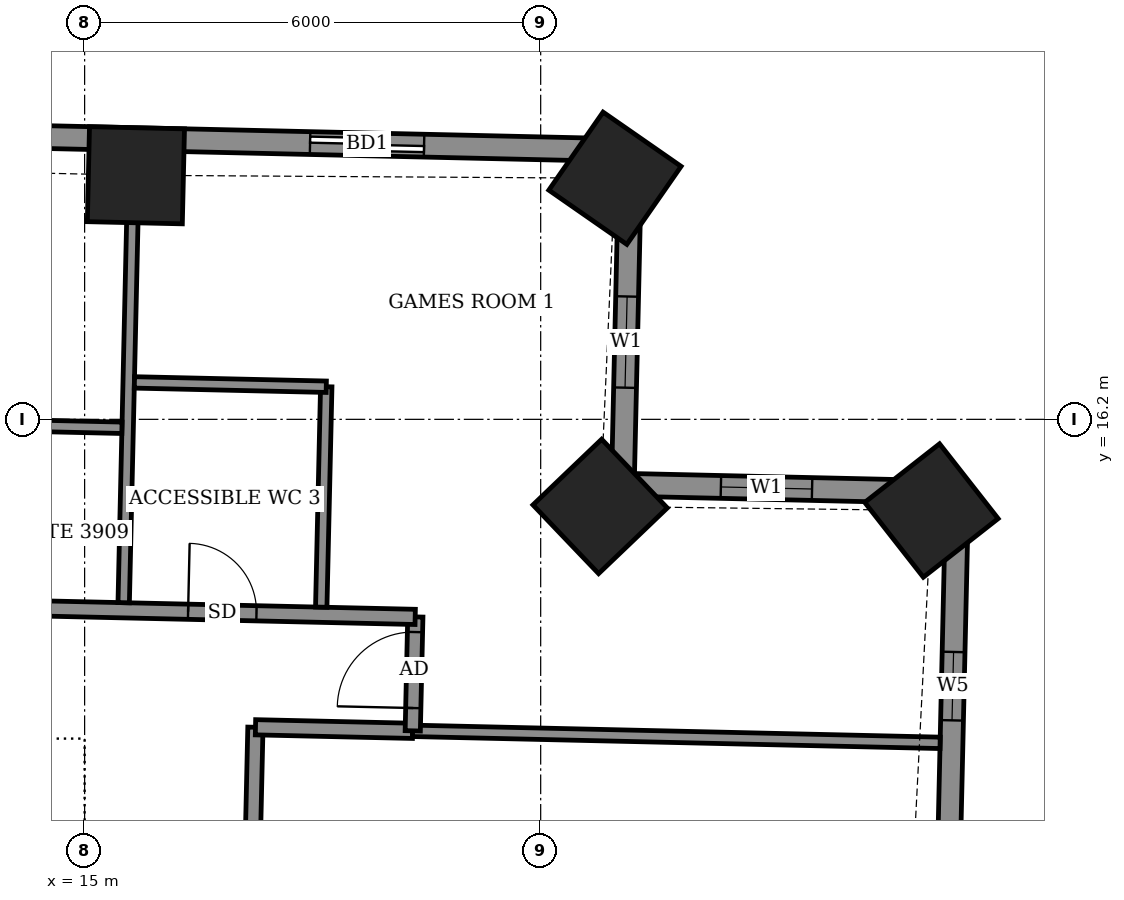
"""IFC4 building model, lengths in metres.
Left out: names, types, materials, properties, quantities, classifications, styles, units other than length and angle.
Written with IfcOpenShell. Run it as: python <this file> out.ifc"""

import sys

from ifc_helpers import new_model, si_unit, direction, frame, frame_2d, origin, origin_2d, place, context, subcontext, project, spatial, rectangle, extrude, element, fill, save


model = new_model("IFC4")
c1 = context("Model", 3, precision=1e-05, world=origin(), true_north=direction((0.0, 1.0)))
c2 = subcontext(c1, "Body", "Model", "MODEL_VIEW")
j1 = project(units=[si_unit("LENGTHUNIT", "METRE"), si_unit("PLANEANGLEUNIT", "RADIAN")], contexts=[c1])
p1 = place(None, origin())
s1 = spatial("IfcSite", under=j1, at=p1, CompositionType="ELEMENT")
p2 = place(p1, origin())
s2 = spatial("IfcBuilding", under=s1, at=p2, CompositionType="ELEMENT")
p3 = place(p2, frame((0.0, 0.0, 156.3)))
s3 = spatial("IfcBuildingStorey", under=s2, at=p3, CompositionType="ELEMENT", Elevation=156.3)
for number, where, z_axis, x_axis in (
    (1, (26.141, 15.001, -0.55), (0.0, 0.0, 1.0), (-0.617, 0.787, 0.0)),
    (2, (21.782, 15.054, -0.55), (0.0, 0.0, 1.0), (-0.691, 0.723, 0.0)),
    (3, (21.977, 19.372, -0.55), (0.0, 0.0, 1.0), (-0.821, 0.571, 0.0)),
    (4, (15.675, 19.411, -0.55), (0.0, 0.0, 1.0), (-1.0, 0.023, 0.0)),
):
    element("IfcColumn", number, at=place(p3, frame(where, z_axis=z_axis, x_axis=x_axis)), inside=s3, PredefinedType="COLUMN", context=c2, shape_type="SweptSolid", body=[
        extrude(rectangle(XDim=1.25, YDim=1.25, at=origin_2d()), origin(), (0.0, 0.0, 1.0), 3.6),
    ])
p4 = place(p3, frame((26.238, 4.613, 0.0), z_axis=(0.0, 0.0, 1.0), x_axis=(0.022761056451, 0.999740933597, 0.0)))
e5 = element("IfcWall", 5, at=p4, inside=s3, PredefinedType="SOLIDWALL", context=c2, shape_type="SweptSolid", body=[
    extrude(rectangle(XDim=10.63, YDim=0.3, at=frame_2d((5.315, 0.0))), origin(), (0.0, 0.0, 1.0), 3.05),
])
p5 = place(p4, frame((3.453, 0.0, 0.0)))
e6 = element("IfcOpeningElement", 6, at=p5, cuts=e5, PredefinedType="OPENING", context=c2, shape_type="SweptSolid", body=[
    extrude(rectangle(XDim=1.2, YDim=2.4, at=frame_2d((0.6, 1.2))), frame((0.0, 0.16, 0.0), z_axis=(0.0, -1.0, 0.0), x_axis=(1.0, 0.0, 0.0)), (0.0, 0.0, 1.0), 0.32),
])
p6 = place(p4, frame((7.629, 0.0, 0.9)))
e7 = element("IfcOpeningElement", 7, at=p6, cuts=e5, PredefinedType="OPENING", context=c2, shape_type="SweptSolid", body=[
    extrude(rectangle(XDim=0.9, YDim=1.5, at=frame_2d((0.45, 0.75))), frame((0.0, 0.16, 0.0), z_axis=(0.0, -1.0, 0.0), x_axis=(1.0, 0.0, 0.0)), (0.0, 0.0, 1.0), 0.32),
])
p7 = place(p3, frame((26.48, 15.24, 0.0), z_axis=(0.0, 0.0, 1.0), x_axis=(-0.999741204967, 0.022749133868, 0.0)))
e8 = element("IfcWall", 8, at=p7, inside=s3, PredefinedType="SOLIDWALL", context=c2, shape_type="SweptSolid", body=[
    extrude(rectangle(XDim=4.4, YDim=0.3, at=frame_2d((2.2, 0.0))), origin(), (0.0, 0.0, 1.0), 2.55),
])
p8 = place(p7, frame((1.91, 0.0, 0.9)))
e9 = element("IfcOpeningElement", 9, at=p8, cuts=e8, PredefinedType="OPENING", context=c2, shape_type="SweptSolid", body=[
    extrude(rectangle(XDim=1.2, YDim=1.5, at=frame_2d((0.6, 0.75))), frame((0.0, 0.16, 0.0), z_axis=(0.0, -1.0, 0.0), x_axis=(1.0, 0.0, 0.0)), (0.0, 0.0, 1.0), 0.32),
])
p9 = place(p3, frame((22.081, 15.34, 0.0), z_axis=(0.0, 0.0, 1.0), x_axis=(0.022693676786, 0.999742465355, 0.0)))
e10 = element("IfcWall", 10, at=p9, inside=s3, PredefinedType="SOLIDWALL", context=c2, shape_type="SweptSolid", body=[
    extrude(rectangle(XDim=4.4, YDim=0.3, at=frame_2d((2.2, 0.0))), origin(), (0.0, 0.0, 1.0), 2.55),
])
p10 = place(p9, frame((1.277, 0.0, 0.9)))
e11 = element("IfcOpeningElement", 11, at=p10, cuts=e10, PredefinedType="OPENING", context=c2, shape_type="SweptSolid", body=[
    extrude(rectangle(XDim=1.2, YDim=1.5, at=frame_2d((0.6, 0.75))), frame((0.0, 0.16, 0.0), z_axis=(0.0, -1.0, 0.0), x_axis=(1.0, 0.0, 0.0)), (0.0, 0.0, 1.0), 0.32),
])
p11 = place(p3, frame((22.181, 19.739, 0.0), z_axis=(0.0, 0.0, 1.0), x_axis=(-0.999742618326, 0.022686936846, 0.0)))
e12 = element("IfcWall", 12, at=p11, inside=s3, PredefinedType="SOLIDWALL", context=c2, shape_type="SweptSolid", body=[
    extrude(rectangle(XDim=39.58, YDim=0.3, at=frame_2d((19.79, 0.0))), origin(), (0.0, 0.0, 1.0), 3.05),
])
p12 = place(p11, frame((2.716, 0.0, 0.0)))
e13 = element("IfcOpeningElement", 13, at=p12, cuts=e12, PredefinedType="OPENING", context=c2, shape_type="SweptSolid", body=[
    extrude(rectangle(XDim=1.5, YDim=2.4, at=frame_2d((0.75, 1.2))), frame((0.0, 0.16, 0.0), z_axis=(0.0, -1.0, 0.0), x_axis=(1.0, 0.0, 0.0)), (0.0, 0.0, 1.0), 0.32),
])
p13 = place(p11, frame((8.326, 0.0, 0.0)))
e14 = element("IfcOpeningElement", 14, at=p13, cuts=e12, PredefinedType="OPENING", context=c2, shape_type="SweptSolid", body=[
    extrude(rectangle(XDim=1.5, YDim=2.4, at=frame_2d((0.75, 1.2))), frame((0.0, 0.16, 0.0), z_axis=(0.0, -1.0, 0.0), x_axis=(1.0, 0.0, 0.0)), (0.0, 0.0, 1.0), 0.32),
])
p14 = place(p11, frame((14.049, 0.0, 0.0)))
e15 = element("IfcOpeningElement", 15, at=p14, cuts=e12, PredefinedType="OPENING", context=c2, shape_type="SweptSolid", body=[
    extrude(rectangle(XDim=1.5, YDim=2.4, at=frame_2d((0.75, 1.2))), frame((0.0, 0.16, 0.0), z_axis=(0.0, -1.0, 0.0), x_axis=(1.0, 0.0, 0.0)), (0.0, 0.0, 1.0), 0.32),
])
p15 = place(p11, frame((16.998, 0.0, 0.0)))
e16 = element("IfcOpeningElement", 16, at=p15, cuts=e12, PredefinedType="OPENING", context=c2, shape_type="SweptSolid", body=[
    extrude(rectangle(XDim=1.5, YDim=2.4, at=frame_2d((0.75, 1.2))), frame((0.0, 0.16, 0.0), z_axis=(0.0, -1.0, 0.0), x_axis=(1.0, 0.0, 0.0)), (0.0, 0.0, 1.0), 0.32),
])
p16 = place(p11, frame((22.48, 0.0, 0.0)))
e17 = element("IfcOpeningElement", 17, at=p16, cuts=e12, PredefinedType="OPENING", context=c2, shape_type="SweptSolid", body=[
    extrude(rectangle(XDim=1.5, YDim=2.4, at=frame_2d((0.75, 1.2))), frame((0.0, 0.16, 0.0), z_axis=(0.0, -1.0, 0.0), x_axis=(1.0, 0.0, 0.0)), (0.0, 0.0, 1.0), 0.32),
])
p17 = place(p11, frame((27.846, 0.0, 0.0)))
e18 = element("IfcOpeningElement", 18, at=p17, cuts=e12, PredefinedType="OPENING", context=c2, shape_type="SweptSolid", body=[
    extrude(rectangle(XDim=1.5, YDim=2.4, at=frame_2d((0.75, 1.2))), frame((0.0, 0.16, 0.0), z_axis=(0.0, -1.0, 0.0), x_axis=(1.0, 0.0, 0.0)), (0.0, 0.0, 1.0), 0.32),
])
p18 = place(p11, frame((30.794, 0.0, 0.0)))
e19 = element("IfcOpeningElement", 19, at=p18, cuts=e12, PredefinedType="OPENING", context=c2, shape_type="SweptSolid", body=[
    extrude(rectangle(XDim=1.5, YDim=2.4, at=frame_2d((0.75, 1.2))), frame((0.0, 0.16, 0.0), z_axis=(0.0, -1.0, 0.0), x_axis=(1.0, 0.0, 0.0)), (0.0, 0.0, 1.0), 0.32),
])
p19 = place(p11, frame((35.705, 0.0, 0.9)))
e20 = element("IfcOpeningElement", 20, at=p19, cuts=e12, PredefinedType="OPENING", context=c2, shape_type="SweptSolid", body=[
    extrude(rectangle(XDim=2.4, YDim=1.5, at=frame_2d((1.2, 0.75))), frame((0.0, 0.16, 0.0), z_axis=(0.0, -1.0, 0.0), x_axis=(1.0, 0.0, 0.0)), (0.0, 0.0, 1.0), 0.32),
])
p20 = place(p3, frame((17.149, 7.832, 0.0), z_axis=(0.0, 0.0, 1.0), x_axis=(0.022729111383, 0.999741660378, 0.0)))
e21 = element("IfcWall", 21, at=p20, inside=s3, PredefinedType="PARTITIONING", context=c2, shape_type="SweptSolid", body=[
    extrude(rectangle(XDim=4.318, YDim=0.2, at=frame_2d((2.159, 0.0))), origin(), (0.0, 0.0, 1.0), 3.05),
])
p21 = place(p20, frame((1.761, 0.0, 0.0)))
e22 = element("IfcOpeningElement", 22, at=p21, cuts=e21, PredefinedType="OPENING", context=c2, shape_type="SweptSolid", body=[
    extrude(rectangle(XDim=1.0, YDim=2.1, at=frame_2d((0.5, 1.05))), frame((0.0, 0.11, 0.0), z_axis=(0.0, -1.0, 0.0), x_axis=(1.0, 0.0, 0.0)), (0.0, 0.0, 1.0), 0.22),
])
p22 = place(p3, frame((17.248, 12.149, 0.0), z_axis=(0.0, 0.0, 1.0), x_axis=(0.999742931749, -0.02267312106, 0.0)))
e23 = element("IfcWall", 23, at=p22, inside=s3, PredefinedType="PARTITIONING", context=c2, shape_type="SweptSolid", body=[
    extrude(rectangle(XDim=2.067, YDim=0.2, at=frame_2d((1.034, 0.0))), origin(), (0.0, 0.0, 1.0), 3.05),
])
p23 = place(p3, frame((19.315, 12.102, 0.0), z_axis=(0.0, 0.0, 1.0), x_axis=(0.999741072391, -0.022754959327, 0.0)))
e24 = element("IfcWall", 24, at=p23, inside=s3, PredefinedType="PARTITIONING", context=c2, shape_type="SweptSolid", body=[
    extrude(rectangle(XDim=6.942, YDim=0.15, at=frame_2d((3.471, 0.0))), origin(), (0.0, 0.0, 1.0), 2.55),
])
p24 = place(p3, frame((19.317, 12.102, 0.0), z_axis=(0.0, 0.0, 1.0), x_axis=(0.02279537805, 0.999740151609, 0.0)))
e25 = element("IfcWall", 25, at=p24, inside=s3, PredefinedType="PARTITIONING", context=c2, shape_type="SweptSolid", body=[
    extrude(rectangle(XDim=1.5, YDim=0.2, at=frame_2d((0.75, 0.0))), origin(), (0.0, 0.0, 1.0), 3.05),
])
p25 = place(p24, frame((0.3, 0.0, 0.0)))
e26 = element("IfcOpeningElement", 26, at=p25, cuts=e25, PredefinedType="OPENING", context=c2, shape_type="SweptSolid", body=[
    extrude(rectangle(XDim=1.0, YDim=2.1, at=frame_2d((0.5, 1.05))), frame((0.0, 0.11, 0.0), z_axis=(0.0, -1.0, 0.0), x_axis=(1.0, 0.0, 0.0)), (0.0, 0.0, 1.0), 0.22),
])
p26 = place(p3, frame((-21.279, 14.523, 0.0), z_axis=(0.0, 0.0, 1.0), x_axis=(0.999742669174, -0.02268469602, 0.0)))
e27 = element("IfcWall", 27, at=p26, inside=s3, PredefinedType="PARTITIONING", context=c2, shape_type="SweptSolid", body=[
    extrude(rectangle(XDim=40.639, YDim=0.2, at=frame_2d((20.319, 0.0))), origin(), (0.0, 0.0, 1.0), 3.05),
])
p27 = place(p26, frame((37.65, 0.0, 0.0)))
e28 = element("IfcOpeningElement", 28, at=p27, cuts=e27, PredefinedType="OPENING", context=c2, shape_type="SweptSolid", body=[
    extrude(rectangle(XDim=0.9, YDim=2.1, at=frame_2d((0.45, 1.05))), frame((0.0, 0.11, 0.0), z_axis=(0.0, -1.0, 0.0), x_axis=(1.0, 0.0, 0.0)), (0.0, 0.0, 1.0), 0.22),
])
p28 = place(p26, frame((32.775, 0.0, 0.0)))
e29 = element("IfcOpeningElement", 29, at=p28, cuts=e27, PredefinedType="OPENING", context=c2, shape_type="SweptSolid", body=[
    extrude(rectangle(XDim=0.9, YDim=2.1, at=frame_2d((0.45, 1.05))), frame((0.0, 0.11, 0.0), z_axis=(0.0, -1.0, 0.0), x_axis=(1.0, 0.0, 0.0)), (0.0, 0.0, 1.0), 0.22),
])
p29 = place(p26, frame((30.4, 0.0, 0.0)))
e30 = element("IfcOpeningElement", 30, at=p29, cuts=e27, PredefinedType="OPENING", context=c2, shape_type="SweptSolid", body=[
    extrude(rectangle(XDim=0.9, YDim=2.1, at=frame_2d((0.45, 1.05))), frame((0.0, 0.11, 0.0), z_axis=(0.0, -1.0, 0.0), x_axis=(1.0, 0.0, 0.0)), (0.0, 0.0, 1.0), 0.22),
])
p30 = place(p26, frame((23.225, 0.0, 0.0)))
e31 = element("IfcOpeningElement", 31, at=p30, cuts=e27, PredefinedType="OPENING", context=c2, shape_type="SweptSolid", body=[
    extrude(rectangle(XDim=0.9, YDim=2.1, at=frame_2d((0.45, 1.05))), frame((0.0, 0.11, 0.0), z_axis=(0.0, -1.0, 0.0), x_axis=(1.0, 0.0, 0.0)), (0.0, 0.0, 1.0), 0.22),
])
p31 = place(p26, frame((20.85, 0.0, 0.0)))
e32 = element("IfcOpeningElement", 32, at=p31, cuts=e27, PredefinedType="OPENING", context=c2, shape_type="SweptSolid", body=[
    extrude(rectangle(XDim=0.9, YDim=2.1, at=frame_2d((0.45, 1.05))), frame((0.0, 0.11, 0.0), z_axis=(0.0, -1.0, 0.0), x_axis=(1.0, 0.0, 0.0)), (0.0, 0.0, 1.0), 0.22),
])
p32 = place(p26, frame((13.675, 0.0, 0.0)))
e33 = element("IfcOpeningElement", 33, at=p32, cuts=e27, PredefinedType="OPENING", context=c2, shape_type="SweptSolid", body=[
    extrude(rectangle(XDim=0.9, YDim=2.1, at=frame_2d((0.45, 1.05))), frame((0.0, 0.11, 0.0), z_axis=(0.0, -1.0, 0.0), x_axis=(1.0, 0.0, 0.0)), (0.0, 0.0, 1.0), 0.22),
])
p33 = place(p26, frame((11.325, 0.0, 0.0)))
e34 = element("IfcOpeningElement", 34, at=p33, cuts=e27, PredefinedType="OPENING", context=c2, shape_type="SweptSolid", body=[
    extrude(rectangle(XDim=0.9, YDim=2.1, at=frame_2d((0.45, 1.05))), frame((0.0, 0.11, 0.0), z_axis=(0.0, -1.0, 0.0), x_axis=(1.0, 0.0, 0.0)), (0.0, 0.0, 1.0), 0.22),
])
p34 = place(p26, frame((1.6, 0.0, 0.0)))
e35 = element("IfcOpeningElement", 35, at=p34, cuts=e27, PredefinedType="OPENING", context=c2, shape_type="SweptSolid", body=[
    extrude(rectangle(XDim=1.0, YDim=2.1, at=frame_2d((0.5, 1.05))), frame((0.0, 0.11, 0.0), z_axis=(0.0, -1.0, 0.0), x_axis=(1.0, 0.0, 0.0)), (0.0, 0.0, 1.0), 0.22),
])
p35 = place(p26, frame((6.55, 0.0, 0.0)))
e36 = element("IfcOpeningElement", 36, at=p35, cuts=e27, PredefinedType="OPENING", context=c2, shape_type="SweptSolid", body=[
    extrude(rectangle(XDim=0.9, YDim=2.1, at=frame_2d((0.45, 1.05))), frame((0.0, 0.11, 0.0), z_axis=(0.0, -1.0, 0.0), x_axis=(1.0, 0.0, 0.0)), (0.0, 0.0, 1.0), 0.22),
])
p36 = place(p3, frame((15.514, 13.788, 0.0), z_axis=(0.0, 0.0, 1.0), x_axis=(0.022688785847, 0.999742576365, 0.0)))
e37 = element("IfcWall", 37, at=p36, inside=s3, PredefinedType="PARTITIONING", context=c2, shape_type="SweptSolid", body=[
    extrude(rectangle(XDim=5.95, YDim=0.15, at=frame_2d((2.975, 0.0))), origin(), (0.0, 0.0, 1.0), 3.05),
])
p37 = place(p3, frame((18.113, 13.729, 0.0), z_axis=(0.0, 0.0, 1.0), x_axis=(0.022725229174, 0.999741748633, 0.0)))
e38 = element("IfcWall", 38, at=p37, inside=s3, PredefinedType="PARTITIONING", context=c2, shape_type="SweptSolid", body=[
    extrude(rectangle(XDim=2.901, YDim=0.15, at=frame_2d((1.45, 0.0))), origin(), (0.0, 0.0, 1.0), 3.05),
])
p38 = place(p3, frame((13.167, 16.142, 0.0), z_axis=(0.0, 0.0, 1.0), x_axis=(0.999740260747, -0.02279059109, 0.0)))
e39 = element("IfcWall", 39, at=p38, inside=s3, PredefinedType="PARTITIONING", context=c2, shape_type="SweptSolid", body=[
    extrude(rectangle(XDim=2.324, YDim=0.15, at=frame_2d((1.162, 0.0))), origin(), (0.0, 0.0, 1.0), 3.05),
])
p39 = place(p3, frame((15.655, 16.686, 0.0), z_axis=(0.0, 0.0, 1.0), x_axis=(0.99974392816, -0.022629142889, 0.0)))
e40 = element("IfcWall", 40, at=p39, inside=s3, PredefinedType="PARTITIONING", context=c2, shape_type="SweptSolid", body=[
    extrude(rectangle(XDim=2.525, YDim=0.15, at=frame_2d((1.262, 0.0))), origin(), (0.0, 0.0, 1.0), 3.05),
])
p40 = place(p3, frame((-14.7, 11.25, 0.0), z_axis=(0.0, 0.0, 1.0), x_axis=(1.0, 0.0, 0.0)))
e41 = element("IfcWall", 41, at=p40, inside=s3, PredefinedType="SHEAR", context=c2, shape_type="SweptSolid", body=[
    extrude(rectangle(XDim=29.4, YDim=0.9, at=frame_2d((14.7, 0.0))), origin(), (0.0, 0.0, 1.0), 3.6),
])
p41 = place(p6, origin())
e42 = element("IfcWindow", 42, at=p41, inside=s3, PartitioningType="SINGLE_PANEL", PredefinedType="WINDOW", context=c2, shape_type="SweptSolid", body=[
    extrude(rectangle(XDim=0.9, YDim=1.5, at=frame_2d((0.45, 0.75))), frame((0.0, 0.03, 0.0), z_axis=(0.0, -1.0, 0.0), x_axis=(1.0, 0.0, 0.0)), (0.0, 0.0, 1.0), 0.06),
])
fill(e7, e42)
p42 = place(p8, origin())
e43 = element("IfcWindow", 43, at=p42, inside=s3, PartitioningType="SINGLE_PANEL", PredefinedType="WINDOW", context=c2, shape_type="SweptSolid", body=[
    extrude(rectangle(XDim=1.2, YDim=1.5, at=frame_2d((0.6, 0.75))), frame((0.0, 0.03, 0.0), z_axis=(0.0, -1.0, 0.0), x_axis=(1.0, 0.0, 0.0)), (0.0, 0.0, 1.0), 0.06),
])
fill(e9, e43)
p43 = place(p10, origin())
e44 = element("IfcWindow", 44, at=p43, inside=s3, PartitioningType="SINGLE_PANEL", PredefinedType="WINDOW", context=c2, shape_type="SweptSolid", body=[
    extrude(rectangle(XDim=1.2, YDim=1.5, at=frame_2d((0.6, 0.75))), frame((0.0, 0.03, 0.0), z_axis=(0.0, -1.0, 0.0), x_axis=(1.0, 0.0, 0.0)), (0.0, 0.0, 1.0), 0.06),
])
fill(e11, e44)
p44 = place(p12, origin())
e45 = element("IfcDoor", 45, at=p44, inside=s3, OperationType="SLIDING_TO_LEFT", PredefinedType="DOOR", context=c2, shape_type="SweptSolid", body=[
    extrude(rectangle(XDim=1.5, YDim=2.4, at=frame_2d((0.75, 1.2))), frame((0.0, 0.025, 0.0), z_axis=(0.0, -1.0, 0.0), x_axis=(1.0, 0.0, 0.0)), (0.0, 0.0, 1.0), 0.05),
])
fill(e13, e45)
p45 = place(p25, origin())
e46 = element("IfcDoor", 46, at=p45, inside=s3, OperationType="SINGLE_SWING_LEFT", PredefinedType="DOOR", context=c2, shape_type="SweptSolid", body=[
    extrude(rectangle(XDim=1.0, YDim=2.1, at=frame_2d((0.5, 1.05))), frame((0.0, 0.025, 0.0), z_axis=(0.0, -1.0, 0.0), x_axis=(1.0, 0.0, 0.0)), (0.0, 0.0, 1.0), 0.05),
])
fill(e26, e46)
p46 = place(p27, origin())
e47 = element("IfcDoor", 47, at=p46, inside=s3, OperationType="SINGLE_SWING_LEFT", PredefinedType="DOOR", context=c2, shape_type="SweptSolid", body=[
    extrude(rectangle(XDim=0.9, YDim=2.1, at=frame_2d((0.45, 1.05))), frame((0.0, 0.025, 0.0), z_axis=(0.0, -1.0, 0.0), x_axis=(1.0, 0.0, 0.0)), (0.0, 0.0, 1.0), 0.05),
])
fill(e28, e47)
save(model, sys.argv[1])
